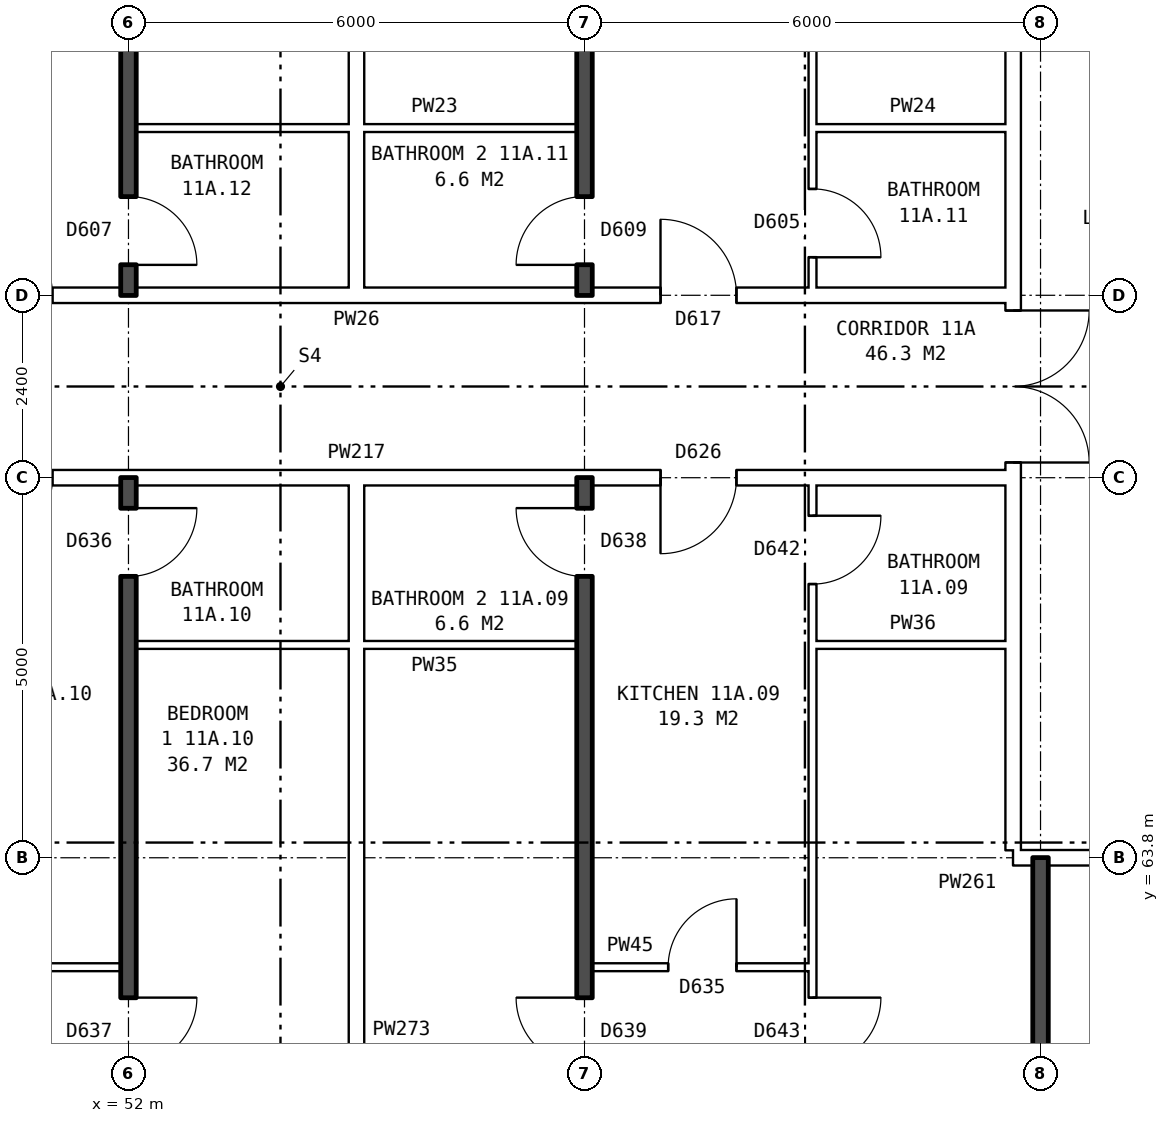
"""IFC4 building model, lengths in metres.
Left out: names, types, materials, properties, quantities, classifications, styles, units other than length and angle.
Written with IfcOpenShell. Run it as: python <this file> out.ifc"""

import sys

from ifc_helpers import new_model, si_unit, direction, frame, frame_2d, origin, place, context, subcontext, project, spatial, rectangle, extrude, element, fill, save


model = new_model("IFC4")
c1 = context("Model", 3, precision=1e-05, world=origin(), true_north=direction((0.0, 1.0)))
c2 = subcontext(c1, "Body", "Model", "MODEL_VIEW")
j1 = project(units=[si_unit("LENGTHUNIT", "METRE"), si_unit("PLANEANGLEUNIT", "RADIAN")], contexts=[c1])
p1 = place(None, origin())
s1 = spatial("IfcSite", under=j1, at=p1, CompositionType="ELEMENT")
p2 = place(p1, origin())
s2 = spatial("IfcBuilding", under=s1, at=p2, CompositionType="ELEMENT")
p3 = place(p2, frame((0.0, 0.0, 44.3)))
s3 = spatial("IfcBuildingStorey", under=s2, at=p3, CompositionType="ELEMENT", Elevation=44.3)
p4 = place(p3, frame((63.64, 63.9, 0.0), z_axis=(0.0, 0.0, 1.0), x_axis=(0.0, 1.0, 0.0)))
e1 = element("IfcWall", 1, at=p4, inside=s3, PredefinedType="PARTITIONING", context=c2, shape_type="SweptSolid", body=[
    extrude(rectangle(XDim=12.2, YDim=0.2, at=frame_2d((6.1, 0.0))), origin(), (0.0, 0.0, 1.0), 2.85),
])
p5 = place(p4, frame((5.1, 0.0, 0.0)))
e2 = element("IfcOpeningElement", 2, at=p5, cuts=e1, PredefinedType="OPENING", context=c2, shape_type="SweptSolid", body=[
    extrude(rectangle(XDim=2.0, YDim=2.1, at=frame_2d((1.0, 1.05))), frame((0.0, 0.11, 0.0), z_axis=(0.0, -1.0, 0.0), x_axis=(1.0, 0.0, 0.0)), (0.0, 0.0, 1.0), 0.22),
])
p6 = place(p3, frame((49.0, 62.36, 0.0), z_axis=(0.0, 0.0, 1.0), x_axis=(1.0, 0.0, 0.0)))
e3 = element("IfcWall", 3, at=p6, inside=s3, PredefinedType="PARTITIONING", context=c2, shape_type="SweptSolid", body=[
    extrude(rectangle(XDim=2.9, YDim=0.1, at=frame_2d((1.45, 0.0))), origin(), (0.0, 0.0, 1.0), 2.85),
])
p7 = place(p6, frame((1.0, 0.0, 0.0)))
e4 = element("IfcOpeningElement", 4, at=p7, cuts=e3, PredefinedType="OPENING", context=c2, shape_type="SweptSolid", body=[
    extrude(rectangle(XDim=0.9, YDim=2.1, at=frame_2d((0.45, 1.05))), frame((0.0, 0.06, 0.0), z_axis=(0.0, -1.0, 0.0), x_axis=(1.0, 0.0, 0.0)), (0.0, 0.0, 1.0), 0.12),
])
p8 = place(p3, frame((58.1, 62.36, 0.0), z_axis=(0.0, 0.0, 1.0), x_axis=(1.0, 0.0, 0.0)))
e5 = element("IfcWall", 5, at=p8, inside=s3, PredefinedType="PARTITIONING", context=c2, shape_type="SweptSolid", body=[
    extrude(rectangle(XDim=2.9, YDim=0.1, at=frame_2d((1.45, 0.0))), origin(), (0.0, 0.0, 1.0), 2.85),
])
p9 = place(p8, frame((1.0, 0.0, 0.0)))
e6 = element("IfcOpeningElement", 6, at=p9, cuts=e5, PredefinedType="OPENING", context=c2, shape_type="SweptSolid", body=[
    extrude(rectangle(XDim=0.9, YDim=2.1, at=frame_2d((0.45, 1.05))), frame((0.0, 0.06, 0.0), z_axis=(0.0, -1.0, 0.0), x_axis=(1.0, 0.0, 0.0)), (0.0, 0.0, 1.0), 0.12),
])
p10 = place(p3, frame((63.64, 63.8, 0.0), z_axis=(0.0, 0.0, 1.0), x_axis=(1.0, 0.0, 0.0)))
e7 = element("IfcWall", 7, at=p10, inside=s3, PredefinedType="PARTITIONING", context=c2, shape_type="SweptSolid", body=[
    extrude(rectangle(XDim=3.0, YDim=0.2, at=frame_2d((1.5, 0.0))), origin(), (0.0, 0.0, 1.0), 2.85),
])
p11 = place(p10, frame((1.18, 0.0, 0.0)))
e8 = element("IfcOpeningElement", 8, at=p11, cuts=e7, PredefinedType="OPENING", context=c2, shape_type="SweptSolid", body=[
    extrude(rectangle(XDim=1.0, YDim=2.1, at=frame_2d((0.5, 1.05))), frame((0.0, 0.11, 0.0), z_axis=(0.0, -1.0, 0.0), x_axis=(1.0, 0.0, 0.0)), (0.0, 0.0, 1.0), 0.22),
])
p12 = place(p3, frame((52.1, 66.6, 0.0), z_axis=(0.0, 0.0, 1.0), x_axis=(1.0, 0.0, 0.0)))
e9 = element("IfcWall", 9, at=p12, inside=s3, PredefinedType="PARTITIONING", context=c2, shape_type="SweptSolid", body=[
    extrude(rectangle(XDim=5.8, YDim=0.1, at=frame_2d((2.9, 0.0))), origin(), (0.0, 0.0, 1.0), 2.85),
])
p13 = place(p3, frame((61.0, 66.6, 0.0), z_axis=(0.0, 0.0, 1.0), x_axis=(1.0, 0.0, 0.0)))
e10 = element("IfcWall", 10, at=p13, inside=s3, PredefinedType="PARTITIONING", context=c2, shape_type="SweptSolid", body=[
    extrude(rectangle(XDim=2.64, YDim=0.1, at=frame_2d((1.32, 0.0))), origin(), (0.0, 0.0, 1.0), 2.85),
])
p14 = place(p3, frame((44.36, 68.8, 0.0), z_axis=(0.0, 0.0, 1.0), x_axis=(1.0, 0.0, 0.0)))
e11 = element("IfcWall", 11, at=p14, inside=s3, PredefinedType="PARTITIONING", context=c2, shape_type="SweptSolid", body=[
    extrude(rectangle(XDim=19.28, YDim=0.2, at=frame_2d((9.64, 0.0))), origin(), (0.0, 0.0, 1.0), 2.85),
])
p15 = place(p14, frame((14.64, 0.0, 0.0)))
e12 = element("IfcOpeningElement", 12, at=p15, cuts=e11, PredefinedType="OPENING", context=c2, shape_type="SweptSolid", body=[
    extrude(rectangle(XDim=1.0, YDim=2.1, at=frame_2d((0.5, 1.05))), frame((0.0, 0.11, 0.0), z_axis=(0.0, -1.0, 0.0), x_axis=(1.0, 0.0, 0.0)), (0.0, 0.0, 1.0), 0.22),
])
p16 = place(p14, frame((5.64, 0.0, 0.0)))
e13 = element("IfcOpeningElement", 13, at=p16, cuts=e11, PredefinedType="OPENING", context=c2, shape_type="SweptSolid", body=[
    extrude(rectangle(XDim=1.0, YDim=2.1, at=frame_2d((0.5, 1.05))), frame((0.0, 0.11, 0.0), z_axis=(0.0, -1.0, 0.0), x_axis=(1.0, 0.0, 0.0)), (0.0, 0.0, 1.0), 0.22),
])
p17 = place(p3, frame((44.36, 71.2, 0.0), z_axis=(0.0, 0.0, 1.0), x_axis=(1.0, 0.0, 0.0)))
e14 = element("IfcWall", 14, at=p17, inside=s3, PredefinedType="PARTITIONING", context=c2, shape_type="SweptSolid", body=[
    extrude(rectangle(XDim=19.28, YDim=0.2, at=frame_2d((9.64, 0.0))), origin(), (0.0, 0.0, 1.0), 2.85),
])
p18 = place(p17, frame((14.64, 0.0, 0.0)))
e15 = element("IfcOpeningElement", 15, at=p18, cuts=e14, PredefinedType="OPENING", context=c2, shape_type="SweptSolid", body=[
    extrude(rectangle(XDim=1.0, YDim=2.1, at=frame_2d((0.5, 1.05))), frame((0.0, 0.11, 0.0), z_axis=(0.0, -1.0, 0.0), x_axis=(1.0, 0.0, 0.0)), (0.0, 0.0, 1.0), 0.22),
])
p19 = place(p17, frame((5.64, 0.0, 0.0)))
e16 = element("IfcOpeningElement", 16, at=p19, cuts=e14, PredefinedType="OPENING", context=c2, shape_type="SweptSolid", body=[
    extrude(rectangle(XDim=1.0, YDim=2.1, at=frame_2d((0.5, 1.05))), frame((0.0, 0.11, 0.0), z_axis=(0.0, -1.0, 0.0), x_axis=(1.0, 0.0, 0.0)), (0.0, 0.0, 1.0), 0.22),
])
p20 = place(p3, frame((52.1, 73.4, 0.0), z_axis=(0.0, 0.0, 1.0), x_axis=(1.0, 0.0, 0.0)))
e17 = element("IfcWall", 17, at=p20, inside=s3, PredefinedType="PARTITIONING", context=c2, shape_type="SweptSolid", body=[
    extrude(rectangle(XDim=5.8, YDim=0.1, at=frame_2d((2.9, 0.0))), origin(), (0.0, 0.0, 1.0), 2.85),
])
p21 = place(p3, frame((61.0, 73.4, 0.0), z_axis=(0.0, 0.0, 1.0), x_axis=(1.0, 0.0, 0.0)))
e18 = element("IfcWall", 18, at=p21, inside=s3, PredefinedType="PARTITIONING", context=c2, shape_type="SweptSolid", body=[
    extrude(rectangle(XDim=2.64, YDim=0.1, at=frame_2d((1.32, 0.0))), origin(), (0.0, 0.0, 1.0), 2.85),
])
p22 = place(p3, frame((52.0, 54.36, 0.0), z_axis=(0.0, 0.0, 1.0), x_axis=(0.0, 1.0, 0.0)))
e19 = element("IfcWall", 19, at=p22, inside=s3, PredefinedType="SOLIDWALL", context=c2, shape_type="SweptSolid", body=[
    extrude(rectangle(XDim=14.44, YDim=0.2, at=frame_2d((7.22, 0.0))), origin(), (0.0, 0.0, 1.0), 2.85),
])
p23 = place(p22, frame((6.7, 0.0, 0.0)))
e20 = element("IfcOpeningElement", 20, at=p23, cuts=e19, PredefinedType="OPENING", context=c2, shape_type="SweptSolid", body=[
    extrude(rectangle(XDim=0.9, YDim=2.1, at=frame_2d((0.45, 1.05))), frame((0.0, 0.11, 0.0), z_axis=(0.0, -1.0, 0.0), x_axis=(1.0, 0.0, 0.0)), (0.0, 0.0, 1.0), 0.22),
])
p24 = place(p22, frame((13.14, 0.0, 0.0)))
e21 = element("IfcOpeningElement", 21, at=p24, cuts=e19, PredefinedType="OPENING", context=c2, shape_type="SweptSolid", body=[
    extrude(rectangle(XDim=0.9, YDim=2.1, at=frame_2d((0.45, 1.05))), frame((0.0, 0.11, 0.0), z_axis=(0.0, -1.0, 0.0), x_axis=(1.0, 0.0, 0.0)), (0.0, 0.0, 1.0), 0.22),
])
p25 = place(p3, frame((52.0, 71.2, 0.0), z_axis=(0.0, 0.0, 1.0), x_axis=(0.0, 1.0, 0.0)))
e22 = element("IfcWall", 22, at=p25, inside=s3, PredefinedType="SOLIDWALL", context=c2, shape_type="SweptSolid", body=[
    extrude(rectangle(XDim=14.44, YDim=0.2, at=frame_2d((7.22, 0.0))), origin(), (0.0, 0.0, 1.0), 2.85),
])
p26 = place(p25, frame((6.84, 0.0, 0.0)))
e23 = element("IfcOpeningElement", 23, at=p26, cuts=e22, PredefinedType="OPENING", context=c2, shape_type="SweptSolid", body=[
    extrude(rectangle(XDim=0.9, YDim=2.1, at=frame_2d((0.45, 1.05))), frame((0.0, 0.11, 0.0), z_axis=(0.0, -1.0, 0.0), x_axis=(1.0, 0.0, 0.0)), (0.0, 0.0, 1.0), 0.22),
])
p27 = place(p25, frame((0.4, 0.0, 0.0)))
e24 = element("IfcOpeningElement", 24, at=p27, cuts=e22, PredefinedType="OPENING", context=c2, shape_type="SweptSolid", body=[
    extrude(rectangle(XDim=0.9, YDim=2.1, at=frame_2d((0.45, 1.05))), frame((0.0, 0.11, 0.0), z_axis=(0.0, -1.0, 0.0), x_axis=(1.0, 0.0, 0.0)), (0.0, 0.0, 1.0), 0.22),
])
for number, where, z_axis, x_axis in (
    (25, (55.0, 54.36, 0.0), (0.0, 0.0, 1.0), (0.0, 1.0, 0.0)),
    (26, (55.0, 71.3, 0.0), (0.0, 0.0, 1.0), (0.0, 1.0, 0.0)),
):
    element("IfcWall", number, at=place(p3, frame(where, z_axis=z_axis, x_axis=x_axis)), inside=s3, PredefinedType="PARTITIONING", context=c2, shape_type="SweptSolid", body=[
        extrude(rectangle(XDim=14.34, YDim=0.2, at=frame_2d((7.17, 0.0))), origin(), (0.0, 0.0, 1.0), 2.85),
    ])
p28 = place(p3, frame((58.0, 54.36, 0.0), z_axis=(0.0, 0.0, 1.0), x_axis=(0.0, 1.0, 0.0)))
e27 = element("IfcWall", 27, at=p28, inside=s3, PredefinedType="SOLIDWALL", context=c2, shape_type="SweptSolid", body=[
    extrude(rectangle(XDim=14.44, YDim=0.2, at=frame_2d((7.22, 0.0))), origin(), (0.0, 0.0, 1.0), 2.85),
])
p29 = place(p28, frame((6.7, 0.0, 0.0)))
e28 = element("IfcOpeningElement", 28, at=p29, cuts=e27, PredefinedType="OPENING", context=c2, shape_type="SweptSolid", body=[
    extrude(rectangle(XDim=0.9, YDim=2.1, at=frame_2d((0.45, 1.05))), frame((0.0, 0.11, 0.0), z_axis=(0.0, -1.0, 0.0), x_axis=(1.0, 0.0, 0.0)), (0.0, 0.0, 1.0), 0.22),
])
p30 = place(p28, frame((13.14, 0.0, 0.0)))
e29 = element("IfcOpeningElement", 29, at=p30, cuts=e27, PredefinedType="OPENING", context=c2, shape_type="SweptSolid", body=[
    extrude(rectangle(XDim=0.9, YDim=2.1, at=frame_2d((0.45, 1.05))), frame((0.0, 0.11, 0.0), z_axis=(0.0, -1.0, 0.0), x_axis=(1.0, 0.0, 0.0)), (0.0, 0.0, 1.0), 0.22),
])
p31 = place(p3, frame((58.0, 71.2, 0.0), z_axis=(0.0, 0.0, 1.0), x_axis=(0.0, 1.0, 0.0)))
e30 = element("IfcWall", 30, at=p31, inside=s3, PredefinedType="SOLIDWALL", context=c2, shape_type="SweptSolid", body=[
    extrude(rectangle(XDim=14.44, YDim=0.2, at=frame_2d((7.22, 0.0))), origin(), (0.0, 0.0, 1.0), 2.85),
])
p32 = place(p31, frame((8.04, 0.0, 0.0)))
e31 = element("IfcOpeningElement", 31, at=p32, cuts=e30, PredefinedType="OPENING", context=c2, shape_type="SweptSolid", body=[
    extrude(rectangle(XDim=0.9, YDim=2.1, at=frame_2d((0.45, 1.05))), frame((0.0, 0.11, 0.0), z_axis=(0.0, -1.0, 0.0), x_axis=(1.0, 0.0, 0.0)), (0.0, 0.0, 1.0), 0.22),
])
p33 = place(p31, frame((0.4, 0.0, 0.0)))
e32 = element("IfcOpeningElement", 32, at=p33, cuts=e30, PredefinedType="OPENING", context=c2, shape_type="SweptSolid", body=[
    extrude(rectangle(XDim=0.9, YDim=2.1, at=frame_2d((0.45, 1.05))), frame((0.0, 0.11, 0.0), z_axis=(0.0, -1.0, 0.0), x_axis=(1.0, 0.0, 0.0)), (0.0, 0.0, 1.0), 0.22),
])
p34 = place(p3, frame((61.0, 54.36, 0.0), z_axis=(0.0, 0.0, 1.0), x_axis=(0.0, 1.0, 0.0)))
e33 = element("IfcWall", 33, at=p34, inside=s3, PredefinedType="PARTITIONING", context=c2, shape_type="SweptSolid", body=[
    extrude(rectangle(XDim=14.34, YDim=0.1, at=frame_2d((7.17, 0.0))), origin(), (0.0, 0.0, 1.0), 2.85),
])
p35 = place(p34, frame((6.7, 0.0, 0.0)))
e34 = element("IfcOpeningElement", 34, at=p35, cuts=e33, PredefinedType="OPENING", context=c2, shape_type="SweptSolid", body=[
    extrude(rectangle(XDim=0.9, YDim=2.1, at=frame_2d((0.45, 1.05))), frame((0.0, 0.06, 0.0), z_axis=(0.0, -1.0, 0.0), x_axis=(1.0, 0.0, 0.0)), (0.0, 0.0, 1.0), 0.12),
])
p36 = place(p34, frame((13.04, 0.0, 0.0)))
e35 = element("IfcOpeningElement", 35, at=p36, cuts=e33, PredefinedType="OPENING", context=c2, shape_type="SweptSolid", body=[
    extrude(rectangle(XDim=0.9, YDim=2.1, at=frame_2d((0.45, 1.05))), frame((0.0, 0.06, 0.0), z_axis=(0.0, -1.0, 0.0), x_axis=(1.0, 0.0, 0.0)), (0.0, 0.0, 1.0), 0.12),
])
p37 = place(p3, frame((61.0, 71.3, 0.0), z_axis=(0.0, 0.0, 1.0), x_axis=(0.0, 1.0, 0.0)))
e36 = element("IfcWall", 36, at=p37, inside=s3, PredefinedType="PARTITIONING", context=c2, shape_type="SweptSolid", body=[
    extrude(rectangle(XDim=14.34, YDim=0.1, at=frame_2d((7.17, 0.0))), origin(), (0.0, 0.0, 1.0), 2.85),
])
p38 = place(p37, frame((7.94, 0.0, 0.0)))
e37 = element("IfcOpeningElement", 37, at=p38, cuts=e36, PredefinedType="OPENING", context=c2, shape_type="SweptSolid", body=[
    extrude(rectangle(XDim=0.9, YDim=2.1, at=frame_2d((0.45, 1.05))), frame((0.0, 0.06, 0.0), z_axis=(0.0, -1.0, 0.0), x_axis=(1.0, 0.0, 0.0)), (0.0, 0.0, 1.0), 0.12),
])
p39 = place(p37, frame((0.4, 0.0, 0.0)))
e38 = element("IfcOpeningElement", 38, at=p39, cuts=e36, PredefinedType="OPENING", context=c2, shape_type="SweptSolid", body=[
    extrude(rectangle(XDim=0.9, YDim=2.1, at=frame_2d((0.45, 1.05))), frame((0.0, 0.06, 0.0), z_axis=(0.0, -1.0, 0.0), x_axis=(1.0, 0.0, 0.0)), (0.0, 0.0, 1.0), 0.12),
])
p40 = place(p3, frame((64.0, 54.36, 0.0), z_axis=(0.0, 0.0, 1.0), x_axis=(0.0, 1.0, 0.0)))
e39 = element("IfcWall", 39, at=p40, inside=s3, PredefinedType="SOLIDWALL", context=c2, shape_type="SweptSolid", body=[
    extrude(rectangle(XDim=9.44, YDim=0.2, at=frame_2d((4.72, 0.0))), origin(), (0.0, 0.0, 1.0), 2.85),
])
p41 = place(p5, frame((2.0, 0.0, 0.0), z_axis=(0.0, 0.0, 1.0), x_axis=(-1.0, 0.0, 0.0)))
e40 = element("IfcDoor", 40, at=p41, inside=s3, OperationType="DOUBLE_DOOR_SINGLE_SWING", PredefinedType="DOOR", context=c2, shape_type="SweptSolid", body=[
    extrude(rectangle(XDim=2.0, YDim=2.1, at=frame_2d((1.0, 1.05))), frame((0.0, 0.025, 0.0), z_axis=(0.0, -1.0, 0.0), x_axis=(1.0, 0.0, 0.0)), (0.0, 0.0, 1.0), 0.05),
])
fill(e2, e40)
p42 = place(p35, frame((0.9, 0.0, 0.0), z_axis=(0.0, 0.0, 1.0), x_axis=(-1.0, 0.0, 0.0)))
e41 = element("IfcDoor", 41, at=p42, inside=s3, OperationType="SINGLE_SWING_LEFT", PredefinedType="DOOR", context=c2, shape_type="SweptSolid", body=[
    extrude(rectangle(XDim=0.9, YDim=2.1, at=frame_2d((0.45, 1.05))), frame((0.0, 0.025, 0.0), z_axis=(0.0, -1.0, 0.0), x_axis=(1.0, 0.0, 0.0)), (0.0, 0.0, 1.0), 0.05),
])
fill(e34, e41)
p43 = place(p29, origin())
e42 = element("IfcDoor", 42, at=p43, inside=s3, OperationType="SINGLE_SWING_RIGHT", PredefinedType="DOOR", context=c2, shape_type="SweptSolid", body=[
    extrude(rectangle(XDim=0.9, YDim=2.1, at=frame_2d((0.45, 1.05))), frame((0.0, 0.025, 0.0), z_axis=(0.0, -1.0, 0.0), x_axis=(1.0, 0.0, 0.0)), (0.0, 0.0, 1.0), 0.05),
])
fill(e28, e42)
p44 = place(p15, frame((1.0, 0.0, 0.0), z_axis=(0.0, 0.0, 1.0), x_axis=(-1.0, 0.0, 0.0)))
e43 = element("IfcDoor", 43, at=p44, inside=s3, OperationType="SINGLE_SWING_RIGHT", PredefinedType="DOOR", context=c2, shape_type="SweptSolid", body=[
    extrude(rectangle(XDim=1.0, YDim=2.1, at=frame_2d((0.5, 1.05))), frame((0.0, 0.025, 0.0), z_axis=(0.0, -1.0, 0.0), x_axis=(1.0, 0.0, 0.0)), (0.0, 0.0, 1.0), 0.05),
])
fill(e12, e43)
p45 = place(p9, origin())
e44 = element("IfcDoor", 44, at=p45, inside=s3, OperationType="SINGLE_SWING_RIGHT", PredefinedType="DOOR", context=c2, shape_type="SweptSolid", body=[
    extrude(rectangle(XDim=0.9, YDim=2.1, at=frame_2d((0.45, 1.05))), frame((0.0, 0.025, 0.0), z_axis=(0.0, -1.0, 0.0), x_axis=(1.0, 0.0, 0.0)), (0.0, 0.0, 1.0), 0.05),
])
fill(e6, e44)
p46 = place(p36, frame((0.9, 0.0, 0.0), z_axis=(0.0, 0.0, 1.0), x_axis=(-1.0, 0.0, 0.0)))
e45 = element("IfcDoor", 45, at=p46, inside=s3, OperationType="SINGLE_SWING_LEFT", PredefinedType="DOOR", context=c2, shape_type="SweptSolid", body=[
    extrude(rectangle(XDim=0.9, YDim=2.1, at=frame_2d((0.45, 1.05))), frame((0.0, 0.025, 0.0), z_axis=(0.0, -1.0, 0.0), x_axis=(1.0, 0.0, 0.0)), (0.0, 0.0, 1.0), 0.05),
])
fill(e35, e45)
p47 = place(p30, origin())
e46 = element("IfcDoor", 46, at=p47, inside=s3, OperationType="SINGLE_SWING_RIGHT", PredefinedType="DOOR", context=c2, shape_type="SweptSolid", body=[
    extrude(rectangle(XDim=0.9, YDim=2.1, at=frame_2d((0.45, 1.05))), frame((0.0, 0.025, 0.0), z_axis=(0.0, -1.0, 0.0), x_axis=(1.0, 0.0, 0.0)), (0.0, 0.0, 1.0), 0.05),
])
fill(e29, e46)
p48 = place(p23, frame((0.9, 0.0, 0.0), z_axis=(0.0, 0.0, 1.0), x_axis=(-1.0, 0.0, 0.0)))
e47 = element("IfcDoor", 47, at=p48, inside=s3, OperationType="SINGLE_SWING_LEFT", PredefinedType="DOOR", context=c2, shape_type="SweptSolid", body=[
    extrude(rectangle(XDim=0.9, YDim=2.1, at=frame_2d((0.45, 1.05))), frame((0.0, 0.025, 0.0), z_axis=(0.0, -1.0, 0.0), x_axis=(1.0, 0.0, 0.0)), (0.0, 0.0, 1.0), 0.05),
])
fill(e20, e47)
p49 = place(p24, frame((0.9, 0.0, 0.0), z_axis=(0.0, 0.0, 1.0), x_axis=(-1.0, 0.0, 0.0)))
e48 = element("IfcDoor", 48, at=p49, inside=s3, OperationType="SINGLE_SWING_LEFT", PredefinedType="DOOR", context=c2, shape_type="SweptSolid", body=[
    extrude(rectangle(XDim=0.9, YDim=2.1, at=frame_2d((0.45, 1.05))), frame((0.0, 0.025, 0.0), z_axis=(0.0, -1.0, 0.0), x_axis=(1.0, 0.0, 0.0)), (0.0, 0.0, 1.0), 0.05),
])
fill(e21, e48)
p50 = place(p18, origin())
e49 = element("IfcDoor", 49, at=p50, inside=s3, OperationType="SINGLE_SWING_LEFT", PredefinedType="DOOR", context=c2, shape_type="SweptSolid", body=[
    extrude(rectangle(XDim=1.0, YDim=2.1, at=frame_2d((0.5, 1.05))), frame((0.0, 0.025, 0.0), z_axis=(0.0, -1.0, 0.0), x_axis=(1.0, 0.0, 0.0)), (0.0, 0.0, 1.0), 0.05),
])
fill(e15, e49)
p51 = place(p39, frame((0.9, 0.0, 0.0), z_axis=(0.0, 0.0, 1.0), x_axis=(-1.0, 0.0, 0.0)))
e50 = element("IfcDoor", 50, at=p51, inside=s3, OperationType="SINGLE_SWING_RIGHT", PredefinedType="DOOR", context=c2, shape_type="SweptSolid", body=[
    extrude(rectangle(XDim=0.9, YDim=2.1, at=frame_2d((0.45, 1.05))), frame((0.0, 0.025, 0.0), z_axis=(0.0, -1.0, 0.0), x_axis=(1.0, 0.0, 0.0)), (0.0, 0.0, 1.0), 0.05),
])
fill(e38, e50)
p52 = place(p33, origin())
e51 = element("IfcDoor", 51, at=p52, inside=s3, OperationType="SINGLE_SWING_LEFT", PredefinedType="DOOR", context=c2, shape_type="SweptSolid", body=[
    extrude(rectangle(XDim=0.9, YDim=2.1, at=frame_2d((0.45, 1.05))), frame((0.0, 0.025, 0.0), z_axis=(0.0, -1.0, 0.0), x_axis=(1.0, 0.0, 0.0)), (0.0, 0.0, 1.0), 0.05),
])
fill(e32, e51)
p53 = place(p27, frame((0.9, 0.0, 0.0), z_axis=(0.0, 0.0, 1.0), x_axis=(-1.0, 0.0, 0.0)))
e52 = element("IfcDoor", 52, at=p53, inside=s3, OperationType="SINGLE_SWING_RIGHT", PredefinedType="DOOR", context=c2, shape_type="SweptSolid", body=[
    extrude(rectangle(XDim=0.9, YDim=2.1, at=frame_2d((0.45, 1.05))), frame((0.0, 0.025, 0.0), z_axis=(0.0, -1.0, 0.0), x_axis=(1.0, 0.0, 0.0)), (0.0, 0.0, 1.0), 0.05),
])
fill(e24, e52)
save(model, sys.argv[1])
